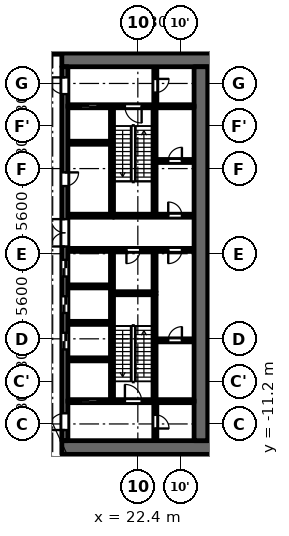
"""IFC4 building model, lengths in metres.
Left out: names, types, materials, properties, quantities, classifications, styles, units other than length and angle.
Written with IfcOpenShell. Run it as: python <this file> out.ifc"""

import sys

from ifc_helpers import new_model, si_unit, direction, frame, frame_2d, origin, place, context, subcontext, project, spatial, rectangle, extrude, element, fill, save


model = new_model("IFC4")
c1 = context("Model", 3, precision=1e-05, world=origin(), true_north=direction((0.0, 1.0)))
c2 = subcontext(c1, "Body", "Model", "MODEL_VIEW")
j1 = project(units=[si_unit("LENGTHUNIT", "METRE"), si_unit("PLANEANGLEUNIT", "RADIAN")], contexts=[c1])
p1 = place(None, origin())
s1 = spatial("IfcSite", under=j1, at=p1, CompositionType="ELEMENT")
p2 = place(p1, origin())
s2 = spatial("IfcBuilding", under=s1, at=p2, CompositionType="ELEMENT")
p3 = place(p2, frame((0.0, 0.0, 20.9)))
s3 = spatial("IfcBuildingStorey", under=s2, at=p3, CompositionType="ELEMENT", Elevation=20.9)
p4 = place(p3, frame((23.5, -2.5, 0.0), z_axis=(0.0, 0.0, 1.0), x_axis=(0.0, 1.0, 0.0)))
e1 = element("IfcWall", 1, at=p4, inside=s3, PredefinedType="PARTITIONING", context=c2, shape_type="SweptSolid", body=[
    extrude(rectangle(XDim=2.65, YDim=0.2, at=frame_2d((1.325, 0.0))), origin(), (0.0, 0.0, 1.0), 4.45),
])
p5 = place(p3, frame((20.7, 2.6, 0.0), z_axis=(0.0, 0.0, 1.0), x_axis=(0.0, 1.0, 0.0)))
e2 = element("IfcWall", 2, at=p5, inside=s3, PredefinedType="SHEAR", context=c2, shape_type="SweptSolid", body=[
    extrude(rectangle(XDim=7.0, YDim=0.2, at=frame_2d((3.5, 0.0))), origin(), (0.0, 0.0, 1.0), 4.45),
])
p6 = place(p3, frame((20.7, -9.6, 0.0), z_axis=(0.0, 0.0, 1.0), x_axis=(0.0, 1.0, 0.0)))
e3 = element("IfcWall", 3, at=p6, inside=s3, PredefinedType="SHEAR", context=c2, shape_type="SweptSolid", body=[
    extrude(rectangle(XDim=9.75, YDim=0.2, at=frame_2d((4.875, 0.0))), origin(), (0.0, 0.0, 1.0), 4.45),
])
p7 = place(p3, frame((20.8, 2.5, 0.0), z_axis=(0.0, 0.0, 1.0), x_axis=(1.0, 0.0, 0.0)))
e4 = element("IfcWall", 4, at=p7, inside=s3, PredefinedType="SHEAR", context=c2, shape_type="SweptSolid", body=[
    extrude(rectangle(XDim=5.3, YDim=0.2, at=frame_2d((2.65, 0.0))), origin(), (0.0, 0.0, 1.0), 4.45),
])
p8 = place(p7, frame((3.6, 0.0, 0.0)))
e5 = element("IfcOpeningElement", 5, at=p8, cuts=e4, PredefinedType="OPENING", context=c2, shape_type="SweptSolid", body=[
    extrude(rectangle(XDim=0.9, YDim=2.1, at=frame_2d((0.45, 1.05))), frame((0.0, 0.11, 0.0), z_axis=(0.0, -1.0, 0.0), x_axis=(1.0, 0.0, 0.0)), (0.0, 0.0, 1.0), 0.22),
])
p9 = place(p3, frame((20.8, 0.25, 0.0), z_axis=(0.0, 0.0, 1.0), x_axis=(1.0, 0.0, 0.0)))
e6 = element("IfcWall", 6, at=p9, inside=s3, PredefinedType="PARTITIONING", context=c2, shape_type="SweptSolid", body=[
    extrude(rectangle(XDim=5.3, YDim=0.2, at=frame_2d((2.65, 0.0))), origin(), (0.0, 0.0, 1.0), 4.45),
])
p10 = place(p9, frame((0.85, 0.0, 0.0)))
e7 = element("IfcOpeningElement", 7, at=p10, cuts=e6, PredefinedType="OPENING", context=c2, shape_type="SweptSolid", body=[
    extrude(rectangle(XDim=0.9, YDim=2.1, at=frame_2d((0.45, 1.05))), frame((0.0, 0.11, 0.0), z_axis=(0.0, -1.0, 0.0), x_axis=(1.0, 0.0, 0.0)), (0.0, 0.0, 1.0), 0.22),
])
p11 = place(p9, frame((3.6, 0.0, 0.0)))
e8 = element("IfcOpeningElement", 8, at=p11, cuts=e6, PredefinedType="OPENING", context=c2, shape_type="SweptSolid", body=[
    extrude(rectangle(XDim=0.9, YDim=2.1, at=frame_2d((0.45, 1.05))), frame((0.0, 0.11, 0.0), z_axis=(0.0, -1.0, 0.0), x_axis=(1.0, 0.0, 0.0)), (0.0, 0.0, 1.0), 0.22),
])
for number, where, z_axis, x_axis in (
    (9, (17.4, 12.75, 0.0), (0.0, 0.0, 1.0), (1.0, 0.0, 0.0)),
    (10, (17.4, -12.75, 0.0), (0.0, 0.0, 1.0), (1.0, 0.0, 0.0)),
):
    element("IfcWall", number, at=place(p3, frame(where, z_axis=z_axis, x_axis=x_axis)), inside=s3, PredefinedType="SHEAR", context=c2, shape_type="SweptSolid", body=[
        extrude(rectangle(XDim=10.4, YDim=0.9, at=frame_2d((5.2, 0.0))), origin(), (0.0, 0.0, 1.0), 4.45),
    ])
p12 = place(p3, frame((17.6, -12.3, 0.0), z_axis=(0.0, 0.0, 1.0), x_axis=(0.0, 1.0, 0.0)))
e11 = element("IfcWall", 11, at=p12, inside=s3, PredefinedType="SHEAR", context=c2, shape_type="SweptSolid", body=[
    extrude(rectangle(XDim=24.6, YDim=0.4, at=frame_2d((12.3, 0.0))), origin(), (0.0, 0.0, 1.0), 4.45),
])
p13 = place(p12, frame((6.0, 0.0, 0.0)))
e12 = element("IfcOpeningElement", 12, at=p13, cuts=e11, PredefinedType="OPENING", context=c2, shape_type="SweptSolid", body=[
    extrude(rectangle(XDim=1.1, YDim=2.1, at=frame_2d((0.55, 1.05))), frame((0.0, 0.21, 0.0), z_axis=(0.0, -1.0, 0.0), x_axis=(1.0, 0.0, 0.0)), (0.0, 0.0, 1.0), 0.42),
])
p14 = place(p12, frame((8.4, 0.0, 0.0)))
e13 = element("IfcOpeningElement", 13, at=p14, cuts=e11, PredefinedType="OPENING", context=c2, shape_type="SweptSolid", body=[
    extrude(rectangle(XDim=1.1, YDim=2.1, at=frame_2d((0.55, 1.05))), frame((0.0, 0.21, 0.0), z_axis=(0.0, -1.0, 0.0), x_axis=(1.0, 0.0, 0.0)), (0.0, 0.0, 1.0), 0.42),
])
p15 = place(p12, frame((10.8, 0.0, 0.0)))
e14 = element("IfcOpeningElement", 14, at=p15, cuts=e11, PredefinedType="OPENING", context=c2, shape_type="SweptSolid", body=[
    extrude(rectangle(XDim=1.1, YDim=2.1, at=frame_2d((0.55, 1.05))), frame((0.0, 0.21, 0.0), z_axis=(0.0, -1.0, 0.0), x_axis=(1.0, 0.0, 0.0)), (0.0, 0.0, 1.0), 0.42),
])
p16 = place(p12, frame((16.75, 0.0, 0.0)))
e15 = element("IfcOpeningElement", 15, at=p16, cuts=e11, PredefinedType="OPENING", context=c2, shape_type="SweptSolid", body=[
    extrude(rectangle(XDim=0.9, YDim=2.1, at=frame_2d((0.45, 1.05))), frame((0.0, 0.21, 0.0), z_axis=(0.0, -1.0, 0.0), x_axis=(1.0, 0.0, 0.0)), (0.0, 0.0, 1.0), 0.42),
])
p17 = place(p12, frame((22.8, 0.0, 0.0)))
e16 = element("IfcOpeningElement", 16, at=p17, cuts=e11, PredefinedType="OPENING", context=c2, shape_type="SweptSolid", body=[
    extrude(rectangle(XDim=1.1, YDim=2.1, at=frame_2d((0.55, 1.05))), frame((0.0, 0.21, 0.0), z_axis=(0.0, -1.0, 0.0), x_axis=(1.0, 0.0, 0.0)), (0.0, 0.0, 1.0), 0.42),
])
p18 = place(p12, frame((0.7, 0.0, 0.0)))
e17 = element("IfcOpeningElement", 17, at=p18, cuts=e11, PredefinedType="OPENING", context=c2, shape_type="SweptSolid", body=[
    extrude(rectangle(XDim=1.1, YDim=2.1, at=frame_2d((0.55, 1.05))), frame((0.0, 0.21, 0.0), z_axis=(0.0, -1.0, 0.0), x_axis=(1.0, 0.0, 0.0)), (0.0, 0.0, 1.0), 0.42),
])
p19 = place(p12, frame((12.775, 0.0, 0.0)))
e18 = element("IfcOpeningElement", 18, at=p19, cuts=e11, PredefinedType="OPENING", context=c2, shape_type="SweptSolid", body=[
    extrude(rectangle(XDim=1.8, YDim=2.1, at=frame_2d((0.9, 1.05))), frame((0.0, 0.21, 0.0), z_axis=(0.0, -1.0, 0.0), x_axis=(1.0, 0.0, 0.0)), (0.0, 0.0, 1.0), 0.42),
])
p20 = place(p3, frame((26.55, -12.3, 0.0), z_axis=(0.0, 0.0, 1.0), x_axis=(0.0, 1.0, 0.0)))
e19 = element("IfcWall", 19, at=p20, inside=s3, PredefinedType="SHEAR", context=c2, shape_type="SweptSolid", body=[
    extrude(rectangle(XDim=24.6, YDim=0.9, at=frame_2d((12.3, 0.0))), origin(), (0.0, 0.0, 1.0), 4.45),
])
p21 = place(p3, frame((23.55, 9.8, 0.0), z_axis=(0.0, 0.0, 1.0), x_axis=(0.0, 1.0, 0.0)))
e20 = element("IfcWall", 20, at=p21, inside=s3, PredefinedType="PARTITIONING", context=c2, shape_type="SweptSolid", body=[
    extrude(rectangle(XDim=2.5, YDim=0.2, at=frame_2d((1.25, 0.0))), origin(), (0.0, 0.0, 1.0), 4.45),
])
p22 = place(p21, frame((0.8, 0.0, 0.0)))
e21 = element("IfcOpeningElement", 21, at=p22, cuts=e20, PredefinedType="OPENING", context=c2, shape_type="SweptSolid", body=[
    extrude(rectangle(XDim=0.9, YDim=2.1, at=frame_2d((0.45, 1.05))), frame((0.0, 0.11, 0.0), z_axis=(0.0, -1.0, 0.0), x_axis=(1.0, 0.0, 0.0)), (0.0, 0.0, 1.0), 0.22),
])
p23 = place(p3, frame((23.55, -12.3, 0.0), z_axis=(0.0, 0.0, 1.0), x_axis=(0.0, 1.0, 0.0)))
e22 = element("IfcWall", 22, at=p23, inside=s3, PredefinedType="PARTITIONING", context=c2, shape_type="SweptSolid", body=[
    extrude(rectangle(XDim=2.5, YDim=0.2, at=frame_2d((1.25, 0.0))), origin(), (0.0, 0.0, 1.0), 4.45),
])
p24 = place(p23, frame((0.8, 0.0, 0.0)))
e23 = element("IfcOpeningElement", 23, at=p24, cuts=e22, PredefinedType="OPENING", context=c2, shape_type="SweptSolid", body=[
    extrude(rectangle(XDim=0.9, YDim=2.1, at=frame_2d((0.45, 1.05))), frame((0.0, 0.11, 0.0), z_axis=(0.0, -1.0, 0.0), x_axis=(1.0, 0.0, 0.0)), (0.0, 0.0, 1.0), 0.22),
])
p25 = place(p3, frame((23.6, -5.7, 0.0), z_axis=(0.0, 0.0, 1.0), x_axis=(1.0, 0.0, 0.0)))
e24 = element("IfcWall", 24, at=p25, inside=s3, PredefinedType="PARTITIONING", context=c2, shape_type="SweptSolid", body=[
    extrude(rectangle(XDim=2.5, YDim=0.2, at=frame_2d((1.25, 0.0))), origin(), (0.0, 0.0, 1.0), 4.45),
])
p26 = place(p25, frame((0.8, 0.0, 0.0)))
e25 = element("IfcOpeningElement", 25, at=p26, cuts=e24, PredefinedType="OPENING", context=c2, shape_type="SweptSolid", body=[
    extrude(rectangle(XDim=0.9, YDim=2.1, at=frame_2d((0.45, 1.05))), frame((0.0, 0.11, 0.0), z_axis=(0.0, -1.0, 0.0), x_axis=(1.0, 0.0, 0.0)), (0.0, 0.0, 1.0), 0.22),
])
p27 = place(p3, frame((23.6, 6.1, 0.0), z_axis=(0.0, 0.0, 1.0), x_axis=(1.0, 0.0, 0.0)))
e26 = element("IfcWall", 26, at=p27, inside=s3, PredefinedType="PARTITIONING", context=c2, shape_type="SweptSolid", body=[
    extrude(rectangle(XDim=2.5, YDim=0.2, at=frame_2d((1.25, 0.0))), origin(), (0.0, 0.0, 1.0), 4.45),
])
p28 = place(p27, frame((0.8, 0.0, 0.0)))
e27 = element("IfcOpeningElement", 27, at=p28, cuts=e26, PredefinedType="OPENING", context=c2, shape_type="SweptSolid", body=[
    extrude(rectangle(XDim=0.9, YDim=2.1, at=frame_2d((0.45, 1.05))), frame((0.0, 0.11, 0.0), z_axis=(0.0, -1.0, 0.0), x_axis=(1.0, 0.0, 0.0)), (0.0, 0.0, 1.0), 0.22),
])
p29 = place(p3, frame((17.8, -9.7, 0.0), z_axis=(0.0, 0.0, 1.0), x_axis=(1.0, 0.0, 0.0)))
e28 = element("IfcWall", 28, at=p29, inside=s3, PredefinedType="SHEAR", context=c2, shape_type="SweptSolid", body=[
    extrude(rectangle(XDim=8.3, YDim=0.2, at=frame_2d((4.15, 0.0))), origin(), (0.0, 0.0, 1.0), 4.45),
])
p30 = place(p29, frame((0.85, 0.0, 0.0)))
e29 = element("IfcOpeningElement", 29, at=p30, cuts=e28, PredefinedType="OPENING", context=c2, shape_type="SweptSolid", body=[
    extrude(rectangle(XDim=1.1, YDim=2.1, at=frame_2d((0.55, 1.05))), frame((0.0, 0.11, 0.0), z_axis=(0.0, -1.0, 0.0), x_axis=(1.0, 0.0, 0.0)), (0.0, 0.0, 1.0), 0.22),
])
p31 = place(p29, frame((3.75, 0.0, 0.0)))
e30 = element("IfcOpeningElement", 30, at=p31, cuts=e28, PredefinedType="OPENING", context=c2, shape_type="SweptSolid", body=[
    extrude(rectangle(XDim=1.1, YDim=2.1, at=frame_2d((0.55, 1.05))), frame((0.0, 0.11, 0.0), z_axis=(0.0, -1.0, 0.0), x_axis=(1.0, 0.0, 0.0)), (0.0, 0.0, 1.0), 0.22),
])
for number, where, z_axis, x_axis in (
    (31, (17.8, -6.95, 0.0), (0.0, 0.0, 1.0), (1.0, 0.0, 0.0)),
    (32, (17.8, -4.55, 0.0), (0.0, 0.0, 1.0), (1.0, 0.0, 0.0)),
    (33, (17.8, -2.15, 0.0), (0.0, 0.0, 1.0), (1.0, 0.0, 0.0)),
):
    element("IfcWall", number, at=place(p3, frame(where, z_axis=z_axis, x_axis=x_axis)), inside=s3, PredefinedType="PARTITIONING", context=c2, shape_type="SweptSolid", body=[
        extrude(rectangle(XDim=2.8, YDim=0.2, at=frame_2d((1.4, 0.0))), origin(), (0.0, 0.0, 1.0), 4.45),
    ])
for number, where, z_axis, x_axis in (
    (34, (17.8, 0.25, 0.0), (0.0, 0.0, 1.0), (1.0, 0.0, 0.0)),
    (35, (17.8, 2.5, 0.0), (0.0, 0.0, 1.0), (1.0, 0.0, 0.0)),
):
    element("IfcWall", number, at=place(p3, frame(where, z_axis=z_axis, x_axis=x_axis)), inside=s3, PredefinedType="PARTITIONING", context=c2, shape_type="SweptSolid", body=[
        extrude(rectangle(XDim=3.0, YDim=0.2, at=frame_2d((1.5, 0.0))), origin(), (0.0, 0.0, 1.0), 4.45),
    ])
p32 = place(p3, frame((17.8, 7.3, 0.0), z_axis=(0.0, 0.0, 1.0), x_axis=(1.0, 0.0, 0.0)))
e36 = element("IfcWall", 36, at=p32, inside=s3, PredefinedType="PARTITIONING", context=c2, shape_type="SweptSolid", body=[
    extrude(rectangle(XDim=2.8, YDim=0.2, at=frame_2d((1.4, 0.0))), origin(), (0.0, 0.0, 1.0), 4.45),
])
p33 = place(p3, frame((17.8, 9.7, 0.0), z_axis=(0.0, 0.0, 1.0), x_axis=(1.0, 0.0, 0.0)))
e37 = element("IfcWall", 37, at=p33, inside=s3, PredefinedType="SHEAR", context=c2, shape_type="SweptSolid", body=[
    extrude(rectangle(XDim=8.3, YDim=0.2, at=frame_2d((4.15, 0.0))), origin(), (0.0, 0.0, 1.0), 4.45),
])
p34 = place(p33, frame((0.85, 0.0, 0.0)))
e38 = element("IfcOpeningElement", 38, at=p34, cuts=e37, PredefinedType="OPENING", context=c2, shape_type="SweptSolid", body=[
    extrude(rectangle(XDim=1.1, YDim=2.1, at=frame_2d((0.55, 1.05))), frame((0.0, 0.11, 0.0), z_axis=(0.0, -1.0, 0.0), x_axis=(1.0, 0.0, 0.0)), (0.0, 0.0, 1.0), 0.22),
])
p35 = place(p33, frame((3.75, 0.0, 0.0)))
e39 = element("IfcOpeningElement", 39, at=p35, cuts=e37, PredefinedType="OPENING", context=c2, shape_type="SweptSolid", body=[
    extrude(rectangle(XDim=1.1, YDim=2.1, at=frame_2d((0.55, 1.05))), frame((0.0, 0.11, 0.0), z_axis=(0.0, -1.0, 0.0), x_axis=(1.0, 0.0, 0.0)), (0.0, 0.0, 1.0), 0.22),
])
p36 = place(p3, frame((23.5, 2.6, 0.0), z_axis=(0.0, 0.0, 1.0), x_axis=(0.0, 1.0, 0.0)))
e40 = element("IfcWall", 40, at=p36, inside=s3, PredefinedType="SHEAR", context=c2, shape_type="SweptSolid", body=[
    extrude(rectangle(XDim=7.0, YDim=0.2, at=frame_2d((3.5, 0.0))), origin(), (0.0, 0.0, 1.0), 4.45),
])
p37 = place(p3, frame((23.5, -9.6, 0.0), z_axis=(0.0, 0.0, 1.0), x_axis=(0.0, 1.0, 0.0)))
e41 = element("IfcWall", 41, at=p37, inside=s3, PredefinedType="SHEAR", context=c2, shape_type="SweptSolid", body=[
    extrude(rectangle(XDim=6.9, YDim=0.2, at=frame_2d((3.45, 0.0))), origin(), (0.0, 0.0, 1.0), 4.45),
])
p38 = place(p3, frame((20.8, -2.6, 0.0), z_axis=(0.0, 0.0, 1.0), x_axis=(1.0, 0.0, 0.0)))
e42 = element("IfcWall", 42, at=p38, inside=s3, PredefinedType="SHEAR", context=c2, shape_type="SweptSolid", body=[
    extrude(rectangle(XDim=2.8, YDim=0.2, at=frame_2d((1.4, 0.0))), origin(), (0.0, 0.0, 1.0), 4.45),
])
p39 = place(p3, frame((-17.4, 13.2, 0.0), z_axis=(0.0, 0.0, 1.0), x_axis=(1.0, 0.0, 0.0)))
e43 = element("IfcWall", 43, at=p39, inside=s3, PredefinedType="PARTITIONING", context=c2, shape_type="SweptSolid", body=[
    extrude(rectangle(XDim=34.8, YDim=0.15, at=frame_2d((17.4, 0.0))), origin(), (0.0, 0.0, 1.0), 4.45),
])
p40 = place(p39, frame((3.05, 0.0, 0.0)))
e44 = element("IfcOpeningElement", 44, at=p40, cuts=e43, PredefinedType="OPENING", context=c2, shape_type="SweptSolid", body=[
    extrude(rectangle(XDim=1.8, YDim=2.1, at=frame_2d((0.9, 1.05))), frame((0.0, 0.085, 0.0), z_axis=(0.0, -1.0, 0.0), x_axis=(1.0, 0.0, 0.0)), (0.0, 0.0, 1.0), 0.17),
])
p41 = place(p39, frame((0.75, 0.0, 0.0)))
e45 = element("IfcOpeningElement", 45, at=p41, cuts=e43, PredefinedType="OPENING", context=c2, shape_type="SweptSolid", body=[
    extrude(rectangle(XDim=1.0, YDim=2.1, at=frame_2d((0.5, 1.05))), frame((0.0, 0.085, 0.0), z_axis=(0.0, -1.0, 0.0), x_axis=(1.0, 0.0, 0.0)), (0.0, 0.0, 1.0), 0.17),
])
p42 = place(p39, frame((33.15, 0.0, 0.0)))
e46 = element("IfcOpeningElement", 46, at=p42, cuts=e43, PredefinedType="OPENING", context=c2, shape_type="SweptSolid", body=[
    extrude(rectangle(XDim=1.0, YDim=2.1, at=frame_2d((0.5, 1.05))), frame((0.0, 0.085, 0.0), z_axis=(0.0, -1.0, 0.0), x_axis=(1.0, 0.0, 0.0)), (0.0, 0.0, 1.0), 0.17),
])
p43 = place(p30, origin())
e47 = element("IfcDoor", 47, at=p43, inside=s3, OperationType="DOUBLE_DOOR_SLIDING", PredefinedType="DOOR", context=c2, shape_type="SweptSolid", body=[
    extrude(rectangle(XDim=1.1, YDim=2.1, at=frame_2d((0.55, 1.05))), frame((0.0, 0.025, 0.0), z_axis=(0.0, -1.0, 0.0), x_axis=(1.0, 0.0, 0.0)), (0.0, 0.0, 1.0), 0.05),
])
fill(e29, e47)
p44 = place(p13, origin())
e48 = element("IfcDoor", 48, at=p44, inside=s3, OperationType="DOUBLE_DOOR_SLIDING", PredefinedType="DOOR", context=c2, shape_type="SweptSolid", body=[
    extrude(rectangle(XDim=1.1, YDim=2.1, at=frame_2d((0.55, 1.05))), frame((0.0, 0.025, 0.0), z_axis=(0.0, -1.0, 0.0), x_axis=(1.0, 0.0, 0.0)), (0.0, 0.0, 1.0), 0.05),
])
fill(e12, e48)
p45 = place(p14, origin())
e49 = element("IfcDoor", 49, at=p45, inside=s3, OperationType="DOUBLE_DOOR_SLIDING", PredefinedType="DOOR", context=c2, shape_type="SweptSolid", body=[
    extrude(rectangle(XDim=1.1, YDim=2.1, at=frame_2d((0.55, 1.05))), frame((0.0, 0.025, 0.0), z_axis=(0.0, -1.0, 0.0), x_axis=(1.0, 0.0, 0.0)), (0.0, 0.0, 1.0), 0.05),
])
fill(e13, e49)
p46 = place(p15, origin())
e50 = element("IfcDoor", 50, at=p46, inside=s3, OperationType="DOUBLE_DOOR_SLIDING", PredefinedType="DOOR", context=c2, shape_type="SweptSolid", body=[
    extrude(rectangle(XDim=1.1, YDim=2.1, at=frame_2d((0.55, 1.05))), frame((0.0, 0.025, 0.0), z_axis=(0.0, -1.0, 0.0), x_axis=(1.0, 0.0, 0.0)), (0.0, 0.0, 1.0), 0.05),
])
fill(e14, e50)
p47 = place(p16, origin())
e51 = element("IfcDoor", 51, at=p47, inside=s3, OperationType="SINGLE_SWING_RIGHT", PredefinedType="DOOR", context=c2, shape_type="SweptSolid", body=[
    extrude(rectangle(XDim=0.9, YDim=2.1, at=frame_2d((0.45, 1.05))), frame((0.0, 0.025, 0.0), z_axis=(0.0, -1.0, 0.0), x_axis=(1.0, 0.0, 0.0)), (0.0, 0.0, 1.0), 0.05),
])
fill(e15, e51)
p48 = place(p34, origin())
e52 = element("IfcDoor", 52, at=p48, inside=s3, OperationType="DOUBLE_DOOR_SLIDING", PredefinedType="DOOR", context=c2, shape_type="SweptSolid", body=[
    extrude(rectangle(XDim=1.1, YDim=2.1, at=frame_2d((0.55, 1.05))), frame((0.0, 0.025, 0.0), z_axis=(0.0, -1.0, 0.0), x_axis=(1.0, 0.0, 0.0)), (0.0, 0.0, 1.0), 0.05),
])
fill(e38, e52)
p49 = place(p17, origin())
e53 = element("IfcDoor", 53, at=p49, inside=s3, OperationType="SINGLE_SWING_LEFT", PredefinedType="DOOR", context=c2, shape_type="SweptSolid", body=[
    extrude(rectangle(XDim=1.1, YDim=2.1, at=frame_2d((0.55, 1.05))), frame((0.0, 0.025, 0.0), z_axis=(0.0, -1.0, 0.0), x_axis=(1.0, 0.0, 0.0)), (0.0, 0.0, 1.0), 0.05),
])
fill(e16, e53)
p50 = place(p18, origin())
e54 = element("IfcDoor", 54, at=p50, inside=s3, OperationType="SINGLE_SWING_RIGHT", PredefinedType="DOOR", context=c2, shape_type="SweptSolid", body=[
    extrude(rectangle(XDim=1.1, YDim=2.1, at=frame_2d((0.55, 1.05))), frame((0.0, 0.025, 0.0), z_axis=(0.0, -1.0, 0.0), x_axis=(1.0, 0.0, 0.0)), (0.0, 0.0, 1.0), 0.05),
])
fill(e17, e54)
p51 = place(p22, origin())
e55 = element("IfcDoor", 55, at=p51, inside=s3, OperationType="SINGLE_SWING_RIGHT", PredefinedType="DOOR", context=c2, shape_type="SweptSolid", body=[
    extrude(rectangle(XDim=0.9, YDim=2.1, at=frame_2d((0.45, 1.05))), frame((0.0, 0.025, 0.0), z_axis=(0.0, -1.0, 0.0), x_axis=(1.0, 0.0, 0.0)), (0.0, 0.0, 1.0), 0.05),
])
fill(e21, e55)
p52 = place(p24, origin())
e56 = element("IfcDoor", 56, at=p52, inside=s3, OperationType="SINGLE_SWING_LEFT", PredefinedType="DOOR", context=c2, shape_type="SweptSolid", body=[
    extrude(rectangle(XDim=0.9, YDim=2.1, at=frame_2d((0.45, 1.05))), frame((0.0, 0.025, 0.0), z_axis=(0.0, -1.0, 0.0), x_axis=(1.0, 0.0, 0.0)), (0.0, 0.0, 1.0), 0.05),
])
fill(e23, e56)
p53 = place(p35, origin())
e57 = element("IfcDoor", 57, at=p53, inside=s3, OperationType="SINGLE_SWING_RIGHT", PredefinedType="DOOR", context=c2, shape_type="SweptSolid", body=[
    extrude(rectangle(XDim=1.1, YDim=2.1, at=frame_2d((0.55, 1.05))), frame((0.0, 0.025, 0.0), z_axis=(0.0, -1.0, 0.0), x_axis=(1.0, 0.0, 0.0)), (0.0, 0.0, 1.0), 0.05),
])
fill(e39, e57)
p54 = place(p31, origin())
e58 = element("IfcDoor", 58, at=p54, inside=s3, OperationType="SINGLE_SWING_RIGHT", PredefinedType="DOOR", context=c2, shape_type="SweptSolid", body=[
    extrude(rectangle(XDim=1.1, YDim=2.1, at=frame_2d((0.55, 1.05))), frame((0.0, 0.025, 0.0), z_axis=(0.0, -1.0, 0.0), x_axis=(1.0, 0.0, 0.0)), (0.0, 0.0, 1.0), 0.05),
])
fill(e30, e58)
p55 = place(p19, origin())
e59 = element("IfcDoor", 59, at=p55, inside=s3, OperationType="DOUBLE_DOOR_SINGLE_SWING", PredefinedType="DOOR", context=c2, shape_type="SweptSolid", body=[
    extrude(rectangle(XDim=1.8, YDim=2.1, at=frame_2d((0.9, 1.05))), frame((0.0, 0.025, 0.0), z_axis=(0.0, -1.0, 0.0), x_axis=(1.0, 0.0, 0.0)), (0.0, 0.0, 1.0), 0.05),
])
fill(e18, e59)
p56 = place(p10, origin())
e60 = element("IfcDoor", 60, at=p56, inside=s3, OperationType="SINGLE_SWING_LEFT", PredefinedType="DOOR", context=c2, shape_type="SweptSolid", body=[
    extrude(rectangle(XDim=0.9, YDim=2.1, at=frame_2d((0.45, 1.05))), frame((0.0, 0.025, 0.0), z_axis=(0.0, -1.0, 0.0), x_axis=(1.0, 0.0, 0.0)), (0.0, 0.0, 1.0), 0.05),
])
fill(e7, e60)
p57 = place(p26, origin())
e61 = element("IfcDoor", 61, at=p57, inside=s3, OperationType="SINGLE_SWING_LEFT", PredefinedType="DOOR", context=c2, shape_type="SweptSolid", body=[
    extrude(rectangle(XDim=0.9, YDim=2.1, at=frame_2d((0.45, 1.05))), frame((0.0, 0.025, 0.0), z_axis=(0.0, -1.0, 0.0), x_axis=(1.0, 0.0, 0.0)), (0.0, 0.0, 1.0), 0.05),
])
fill(e25, e61)
p58 = place(p11, origin())
e62 = element("IfcDoor", 62, at=p58, inside=s3, OperationType="SINGLE_SWING_LEFT", PredefinedType="DOOR", context=c2, shape_type="SweptSolid", body=[
    extrude(rectangle(XDim=0.9, YDim=2.1, at=frame_2d((0.45, 1.05))), frame((0.0, 0.025, 0.0), z_axis=(0.0, -1.0, 0.0), x_axis=(1.0, 0.0, 0.0)), (0.0, 0.0, 1.0), 0.05),
])
fill(e8, e62)
p59 = place(p28, origin())
e63 = element("IfcDoor", 63, at=p59, inside=s3, OperationType="SINGLE_SWING_LEFT", PredefinedType="DOOR", context=c2, shape_type="SweptSolid", body=[
    extrude(rectangle(XDim=0.9, YDim=2.1, at=frame_2d((0.45, 1.05))), frame((0.0, 0.025, 0.0), z_axis=(0.0, -1.0, 0.0), x_axis=(1.0, 0.0, 0.0)), (0.0, 0.0, 1.0), 0.05),
])
fill(e27, e63)
p60 = place(p8, origin())
e64 = element("IfcDoor", 64, at=p60, inside=s3, OperationType="SINGLE_SWING_RIGHT", PredefinedType="DOOR", context=c2, shape_type="SweptSolid", body=[
    extrude(rectangle(XDim=0.9, YDim=2.1, at=frame_2d((0.45, 1.05))), frame((0.0, 0.025, 0.0), z_axis=(0.0, -1.0, 0.0), x_axis=(1.0, 0.0, 0.0)), (0.0, 0.0, 1.0), 0.05),
])
fill(e5, e64)
save(model, sys.argv[1])
